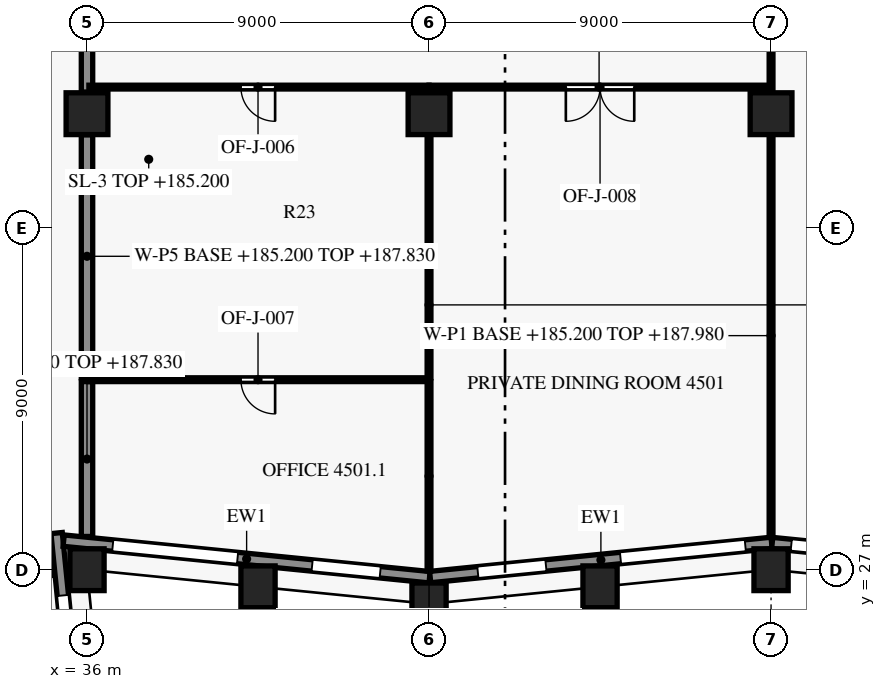
"""IFC4 building model, lengths in metres.
Left out: names, types, materials, properties, quantities, classifications, styles, units other than length and angle.
Written with IfcOpenShell. Run it as: python <this file> out.ifc"""

import sys

from ifc_helpers import new_model, si_unit, direction, frame, frame_2d, origin, origin_2d, place, context, subcontext, project, spatial, rectangle, extrude, element, fill, save


model = new_model("IFC4")
c1 = context("Model", 3, precision=1e-05, world=origin(), true_north=direction((0.0, 1.0)))
c2 = subcontext(c1, "Body", "Model", "MODEL_VIEW")
j1 = project(units=[si_unit("LENGTHUNIT", "METRE"), si_unit("PLANEANGLEUNIT", "RADIAN")], contexts=[c1])
p1 = place(None, origin())
s1 = spatial("IfcSite", under=j1, at=p1, CompositionType="ELEMENT")
p2 = place(p1, origin())
s2 = spatial("IfcBuilding", under=s1, at=p2, CompositionType="ELEMENT")
p3 = place(p2, frame((0.0, 0.0, 185.2)))
s3 = spatial("IfcBuildingStorey", under=s2, at=p3, CompositionType="ELEMENT", Elevation=185.2)
for number, where, z_axis, x_axis in (
    (1, (36.0, 27.0, 0.0), (0.0, 0.0, 1.0), (-0.1, 0.995, 0.0)),
    (2, (40.5, 26.55, 0.0), (0.0, 0.0, 1.0), (0.995, -0.1, 0.0)),
    (3, (45.0, 26.1, 0.0), (0.0, 0.0, 1.0), (1.0, 0.0, 0.0)),
    (4, (49.5, 26.55, 0.0), (0.0, 0.0, 1.0), (0.995, 0.1, 0.0)),
    (5, (54.0, 27.0, 0.0), (0.0, 0.0, 1.0), (1.0, 0.0, 0.0)),
):
    element("IfcColumn", number, at=place(p3, frame(where, z_axis=z_axis, x_axis=x_axis)), inside=s3, PredefinedType="COLUMN", context=c2, shape_type="SweptSolid", body=[
        extrude(rectangle(XDim=0.9, YDim=1.1, at=origin_2d()), origin(), (0.0, 0.0, 1.0), 3.8),
    ])
for number, where, z_axis, x_axis in (
    (6, (36.0, 39.0, 0.0), (0.0, 0.0, 1.0), (1.0, 0.0, 0.0)),
    (7, (45.0, 39.0, 0.0), (0.0, 0.0, 1.0), (1.0, 0.0, 0.0)),
    (8, (54.0, 39.0, 0.0), (0.0, 0.0, 1.0), (1.0, 0.0, 0.0)),
):
    element("IfcColumn", number, at=place(p3, frame(where, z_axis=z_axis, x_axis=x_axis)), inside=s3, PredefinedType="COLUMN", context=c2, shape_type="SweptSolid", body=[
        extrude(rectangle(XDim=1.1, YDim=1.1, at=origin_2d()), origin(), (0.0, 0.0, 1.0), 3.8),
    ])
p4 = place(p3, frame((35.2, 27.964, 0.0), z_axis=(0.0, 0.0, 1.0), x_axis=(0.099501297882, -0.995037432321, 0.0)))
e9 = element("IfcWall", 9, at=p4, inside=s3, PredefinedType="SOLIDWALL", context=c2, shape_type="SweptSolid", body=[
    extrude(rectangle(XDim=9.984, YDim=0.3, at=frame_2d((4.992, 0.0))), origin(), (0.0, 0.0, 1.0), 3.15),
])
p5 = place(p4, frame((1.65, 0.0, 0.15)))
e10 = element("IfcOpeningElement", 10, at=p5, cuts=e9, PredefinedType="OPENING", context=c2, shape_type="SweptSolid", body=[
    extrude(rectangle(XDim=3.3, YDim=2.4, at=frame_2d((1.65, 1.2))), frame((0.0, 0.16, 0.0), z_axis=(0.0, -1.0, 0.0), x_axis=(1.0, 0.0, 0.0)), (0.0, 0.0, 1.0), 0.32),
])
p6 = place(p4, frame((6.923, 0.0, 0.75)))
e11 = element("IfcOpeningElement", 11, at=p6, cuts=e9, PredefinedType="OPENING", context=c2, shape_type="SweptSolid", body=[
    extrude(rectangle(XDim=1.8, YDim=1.8, at=frame_2d((0.9, 0.9))), frame((0.0, 0.16, 0.0), z_axis=(0.0, -1.0, 0.0), x_axis=(1.0, 0.0, 0.0)), (0.0, 0.0, 1.0), 0.32),
])
p7 = place(p3, frame((45.015, 26.802, 0.0), z_axis=(0.0, 0.0, 1.0), x_axis=(-0.995037689759, 0.099498723402, 0.0)))
e12 = element("IfcWall", 12, at=p7, inside=s3, PredefinedType="SOLIDWALL", context=c2, shape_type="SweptSolid", body=[
    extrude(rectangle(XDim=9.677, YDim=0.3, at=frame_2d((4.839, 0.0))), origin(), (0.0, 0.0, 1.0), 3.15),
])
p8 = place(p7, frame((1.306, 0.0, 0.75)))
e13 = element("IfcOpeningElement", 13, at=p8, cuts=e12, PredefinedType="OPENING", context=c2, shape_type="SweptSolid", body=[
    extrude(rectangle(XDim=1.8, YDim=1.8, at=frame_2d((0.9, 0.9))), frame((0.0, 0.16, 0.0), z_axis=(0.0, -1.0, 0.0), x_axis=(1.0, 0.0, 0.0)), (0.0, 0.0, 1.0), 0.32),
])
p9 = place(p7, frame((5.079, 0.0, 0.15)))
e14 = element("IfcOpeningElement", 14, at=p9, cuts=e12, PredefinedType="OPENING", context=c2, shape_type="SweptSolid", body=[
    extrude(rectangle(XDim=3.3, YDim=2.4, at=frame_2d((1.65, 1.2))), frame((0.0, 0.16, 0.0), z_axis=(0.0, -1.0, 0.0), x_axis=(1.0, 0.0, 0.0)), (0.0, 0.0, 1.0), 0.32),
])
p10 = place(p3, frame((54.015, 27.705, 0.0), z_axis=(0.0, 0.0, 1.0), x_axis=(-0.995035316196, -0.099522457379, 0.0)))
e15 = element("IfcWall", 15, at=p10, inside=s3, PredefinedType="SOLIDWALL", context=c2, shape_type="SweptSolid", body=[
    extrude(rectangle(XDim=9.03, YDim=0.3, at=frame_2d((4.515, 0.0))), origin(), (0.0, 0.0, 1.0), 3.15),
])
p11 = place(p10, frame((0.696, 0.0, 0.15)))
e16 = element("IfcOpeningElement", 16, at=p11, cuts=e15, PredefinedType="OPENING", context=c2, shape_type="SweptSolid", body=[
    extrude(rectangle(XDim=3.3, YDim=2.4, at=frame_2d((1.65, 1.2))), frame((0.0, 0.16, 0.0), z_axis=(0.0, -1.0, 0.0), x_axis=(1.0, 0.0, 0.0)), (0.0, 0.0, 1.0), 0.32),
])
p12 = place(p10, frame((5.969, 0.0, 0.75)))
e17 = element("IfcOpeningElement", 17, at=p12, cuts=e15, PredefinedType="OPENING", context=c2, shape_type="SweptSolid", body=[
    extrude(rectangle(XDim=1.8, YDim=1.8, at=frame_2d((0.9, 0.9))), frame((0.0, 0.16, 0.0), z_axis=(0.0, -1.0, 0.0), x_axis=(1.0, 0.0, 0.0)), (0.0, 0.0, 1.0), 0.32),
])
p13 = place(p3, frame((57.965, 27.307, 0.0), z_axis=(0.0, 0.0, 1.0), x_axis=(-0.99503596767, 0.099515943658, 0.0)))
e18 = element("IfcWall", 18, at=p13, inside=s3, PredefinedType="SOLIDWALL", context=c2, shape_type="SweptSolid", body=[
    extrude(rectangle(XDim=3.955, YDim=0.3, at=frame_2d((1.977, 0.0))), origin(), (0.0, 0.0, 1.0), 3.15),
])
p14 = place(p13, frame((0.15, 0.0, 0.15)))
e19 = element("IfcOpeningElement", 19, at=p14, cuts=e18, PredefinedType="OPENING", context=c2, shape_type="SweptSolid", body=[
    extrude(rectangle(XDim=3.3, YDim=2.4, at=frame_2d((1.65, 1.2))), frame((0.0, 0.16, 0.0), z_axis=(0.0, -1.0, 0.0), x_axis=(1.0, 0.0, 0.0)), (0.0, 0.0, 1.0), 0.32),
])
p15 = place(p3, frame((24.555, 27.0, 0.0), z_axis=(0.0, 0.0, 1.0), x_axis=(1.0, 0.0, 0.0)))
e20 = element("IfcWall", 20, at=p15, inside=s3, PredefinedType="PARTITIONING", context=c2, shape_type="SweptSolid", body=[
    extrude(rectangle(XDim=10.571, YDim=0.3, at=frame_2d((5.285, 0.0))), origin(), (0.0, 0.0, 1.0), 2.63),
])
p16 = place(p3, frame((54.0, 27.874, 0.0), z_axis=(0.0, 0.0, 1.0), x_axis=(0.0, 1.0, 0.0)))
e21 = element("IfcWall", 21, at=p16, inside=s3, PredefinedType="PARTITIONING", context=c2, shape_type="SweptSolid", body=[
    extrude(rectangle(XDim=10.571, YDim=0.1, at=frame_2d((5.285, 0.0))), origin(), (0.0, 0.0, 1.0), 2.78),
])
p17 = place(p3, frame((36.0, 27.874, 0.0), z_axis=(0.0, 0.0, 1.0), x_axis=(0.0, 1.0, 0.0)))
e22 = element("IfcWall", 22, at=p17, inside=s3, PredefinedType="PARTITIONING", context=c2, shape_type="SweptSolid", body=[
    extrude(rectangle(XDim=4.076, YDim=0.3, at=frame_2d((2.038, 0.0))), origin(), (0.0, 0.0, 1.0), 2.63),
])
p18 = place(p3, frame((45.0, 31.95, 0.0), z_axis=(0.0, 0.0, 1.0), x_axis=(0.0, -1.0, 0.0)))
e23 = element("IfcWall", 23, at=p18, inside=s3, PredefinedType="PARTITIONING", context=c2, shape_type="SweptSolid", body=[
    extrude(rectangle(XDim=4.976, YDim=0.1, at=frame_2d((2.488, 0.0))), origin(), (0.0, 0.0, 1.0), 2.78),
])
p19 = place(p3, frame((44.95, 32.0, 0.0), z_axis=(0.0, 0.0, 1.0), x_axis=(-1.0, 0.0, 0.0)))
e24 = element("IfcWall", 24, at=p19, inside=s3, PredefinedType="PARTITIONING", context=c2, shape_type="SweptSolid", body=[
    extrude(rectangle(XDim=8.9, YDim=0.1, at=frame_2d((4.45, 0.0))), origin(), (0.0, 0.0, 1.0), 2.63),
])
p20 = place(p19, frame((4.0, 0.0, 0.0)))
e25 = element("IfcOpeningElement", 25, at=p20, cuts=e24, PredefinedType="OPENING", context=c2, shape_type="SweptSolid", body=[
    extrude(rectangle(XDim=0.9, YDim=2.1, at=frame_2d((0.45, 1.05))), frame((0.0, 0.06, 0.0), z_axis=(0.0, -1.0, 0.0), x_axis=(1.0, 0.0, 0.0)), (0.0, 0.0, 1.0), 0.12),
])
p21 = place(p3, frame((36.0, 32.05, 0.0), z_axis=(0.0, 0.0, 1.0), x_axis=(0.0, 1.0, 0.0)))
e26 = element("IfcWall", 26, at=p21, inside=s3, PredefinedType="PARTITIONING", context=c2, shape_type="SweptSolid", body=[
    extrude(rectangle(XDim=6.395, YDim=0.3, at=frame_2d((3.198, 0.0))), origin(), (0.0, 0.0, 1.0), 2.63),
])
p22 = place(p3, frame((45.0, 38.445, 0.0), z_axis=(0.0, 0.0, 1.0), x_axis=(0.0, -1.0, 0.0)))
e27 = element("IfcWall", 27, at=p22, inside=s3, PredefinedType="PARTITIONING", context=c2, shape_type="SweptSolid", body=[
    extrude(rectangle(XDim=6.395, YDim=0.1, at=frame_2d((3.198, 0.0))), origin(), (0.0, 0.0, 1.0), 2.78),
])
p23 = place(p3, frame((45.0, 39.7, 0.0), z_axis=(0.0, 0.0, 1.0), x_axis=(-1.0, 0.0, 0.0)))
e28 = element("IfcWall", 28, at=p23, inside=s3, PredefinedType="PARTITIONING", context=c2, shape_type="SweptSolid", body=[
    extrude(rectangle(XDim=8.95, YDim=0.1, at=frame_2d((4.475, 0.0))), origin(), (0.0, 0.0, 1.0), 2.63),
])
p24 = place(p23, frame((4.05, 0.0, 0.0)))
e29 = element("IfcOpeningElement", 29, at=p24, cuts=e28, PredefinedType="OPENING", context=c2, shape_type="SweptSolid", body=[
    extrude(rectangle(XDim=0.9, YDim=2.1, at=frame_2d((0.45, 1.05))), frame((0.0, 0.06, 0.0), z_axis=(0.0, -1.0, 0.0), x_axis=(1.0, 0.0, 0.0)), (0.0, 0.0, 1.0), 0.12),
])
p25 = place(p3, frame((53.95, 39.7, 0.0), z_axis=(0.0, 0.0, 1.0), x_axis=(-1.0, 0.0, 0.0)))
e30 = element("IfcWall", 30, at=p25, inside=s3, PredefinedType="PARTITIONING", context=c2, shape_type="SweptSolid", body=[
    extrude(rectangle(XDim=8.95, YDim=0.1, at=frame_2d((4.475, 0.0))), origin(), (0.0, 0.0, 1.0), 2.78),
])
p26 = place(p25, frame((3.55, 0.0, 0.0)))
e31 = element("IfcOpeningElement", 31, at=p26, cuts=e30, PredefinedType="OPENING", context=c2, shape_type="SweptSolid", body=[
    extrude(rectangle(XDim=1.8, YDim=2.1, at=frame_2d((0.9, 1.05))), frame((0.0, 0.06, 0.0), z_axis=(0.0, -1.0, 0.0), x_axis=(1.0, 0.0, 0.0)), (0.0, 0.0, 1.0), 0.12),
])
p27 = place(p3, frame((36.0, 39.57, 0.0), z_axis=(0.0, 0.0, 1.0), x_axis=(0.0, 1.0, 0.0)))
e32 = element("IfcWall", 32, at=p27, inside=s3, PredefinedType="PARTITIONING", context=c2, shape_type="SweptSolid", body=[
    extrude(rectangle(XDim=8.968, YDim=0.3, at=frame_2d((4.484, 0.0))), origin(), (0.0, 0.0, 1.0), 2.63),
])
p28 = place(p3, frame((54.0, 42.85, 0.0), z_axis=(0.0, 0.0, 1.0), x_axis=(0.0, -1.0, 0.0)))
e33 = element("IfcWall", 33, at=p28, inside=s3, PredefinedType="PARTITIONING", context=c2, shape_type="SweptSolid", body=[
    extrude(rectangle(XDim=3.28, YDim=0.1, at=frame_2d((1.64, 0.0))), origin(), (0.0, 0.0, 1.0), 2.78),
])
p29 = place(p5, origin())
e34 = element("IfcWindow", 34, at=p29, inside=s3, PartitioningType="SINGLE_PANEL", PredefinedType="WINDOW", context=c2, shape_type="SweptSolid", body=[
    extrude(rectangle(XDim=3.3, YDim=2.4, at=frame_2d((1.65, 1.2))), frame((0.0, 0.03, 0.0), z_axis=(0.0, -1.0, 0.0), x_axis=(1.0, 0.0, 0.0)), (0.0, 0.0, 1.0), 0.06),
])
fill(e10, e34)
p30 = place(p8, origin())
e35 = element("IfcWindow", 35, at=p30, inside=s3, PartitioningType="SINGLE_PANEL", PredefinedType="WINDOW", context=c2, shape_type="SweptSolid", body=[
    extrude(rectangle(XDim=1.8, YDim=1.8, at=frame_2d((0.9, 0.9))), frame((0.0, 0.03, 0.0), z_axis=(0.0, -1.0, 0.0), x_axis=(1.0, 0.0, 0.0)), (0.0, 0.0, 1.0), 0.06),
])
fill(e13, e35)
p31 = place(p9, origin())
e36 = element("IfcWindow", 36, at=p31, inside=s3, PartitioningType="SINGLE_PANEL", PredefinedType="WINDOW", context=c2, shape_type="SweptSolid", body=[
    extrude(rectangle(XDim=3.3, YDim=2.4, at=frame_2d((1.65, 1.2))), frame((0.0, 0.03, 0.0), z_axis=(0.0, -1.0, 0.0), x_axis=(1.0, 0.0, 0.0)), (0.0, 0.0, 1.0), 0.06),
])
fill(e14, e36)
p32 = place(p11, origin())
e37 = element("IfcWindow", 37, at=p32, inside=s3, PartitioningType="SINGLE_PANEL", PredefinedType="WINDOW", context=c2, shape_type="SweptSolid", body=[
    extrude(rectangle(XDim=3.3, YDim=2.4, at=frame_2d((1.65, 1.2))), frame((0.0, 0.03, 0.0), z_axis=(0.0, -1.0, 0.0), x_axis=(1.0, 0.0, 0.0)), (0.0, 0.0, 1.0), 0.06),
])
fill(e16, e37)
p33 = place(p12, origin())
e38 = element("IfcWindow", 38, at=p33, inside=s3, PartitioningType="SINGLE_PANEL", PredefinedType="WINDOW", context=c2, shape_type="SweptSolid", body=[
    extrude(rectangle(XDim=1.8, YDim=1.8, at=frame_2d((0.9, 0.9))), frame((0.0, 0.03, 0.0), z_axis=(0.0, -1.0, 0.0), x_axis=(1.0, 0.0, 0.0)), (0.0, 0.0, 1.0), 0.06),
])
fill(e17, e38)
p34 = place(p14, origin())
e39 = element("IfcWindow", 39, at=p34, inside=s3, PartitioningType="SINGLE_PANEL", PredefinedType="WINDOW", context=c2, shape_type="SweptSolid", body=[
    extrude(rectangle(XDim=3.3, YDim=2.4, at=frame_2d((1.65, 1.2))), frame((0.0, 0.03, 0.0), z_axis=(0.0, -1.0, 0.0), x_axis=(1.0, 0.0, 0.0)), (0.0, 0.0, 1.0), 0.06),
])
fill(e19, e39)
p35 = place(p24, origin())
e40 = element("IfcDoor", 40, at=p35, inside=s3, OperationType="SINGLE_SWING_LEFT", PredefinedType="DOOR", context=c2, shape_type="SweptSolid", body=[
    extrude(rectangle(XDim=0.9, YDim=2.1, at=frame_2d((0.45, 1.05))), frame((0.0, 0.025, 0.0), z_axis=(0.0, -1.0, 0.0), x_axis=(1.0, 0.0, 0.0)), (0.0, 0.0, 1.0), 0.05),
])
fill(e29, e40)
p36 = place(p20, origin())
e41 = element("IfcDoor", 41, at=p36, inside=s3, OperationType="SINGLE_SWING_LEFT", PredefinedType="DOOR", context=c2, shape_type="SweptSolid", body=[
    extrude(rectangle(XDim=0.9, YDim=2.1, at=frame_2d((0.45, 1.05))), frame((0.0, 0.025, 0.0), z_axis=(0.0, -1.0, 0.0), x_axis=(1.0, 0.0, 0.0)), (0.0, 0.0, 1.0), 0.05),
])
fill(e25, e41)
p37 = place(p26, origin())
e42 = element("IfcDoor", 42, at=p37, inside=s3, OperationType="DOUBLE_DOOR_SINGLE_SWING", PredefinedType="DOOR", context=c2, shape_type="SweptSolid", body=[
    extrude(rectangle(XDim=1.8, YDim=2.1, at=frame_2d((0.9, 1.05))), frame((0.0, 0.025, 0.0), z_axis=(0.0, -1.0, 0.0), x_axis=(1.0, 0.0, 0.0)), (0.0, 0.0, 1.0), 0.05),
])
fill(e31, e42)
save(model, sys.argv[1])
